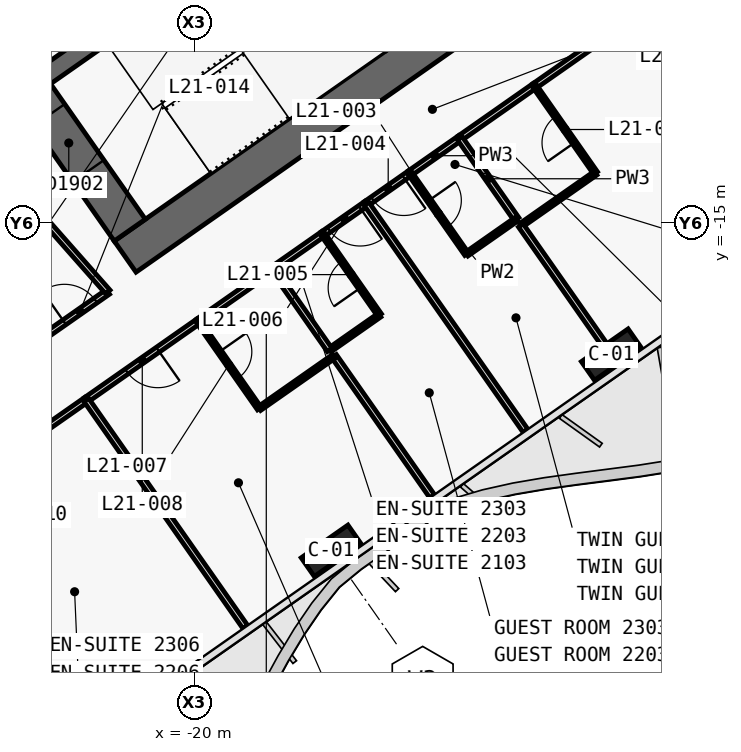
"""IFC4 building model, lengths in metres.
Left out: names, types, materials, properties, quantities, classifications, styles, units other than length and angle.
Written with IfcOpenShell. Run it as: python <this file> out.ifc"""

import sys

from ifc_helpers import new_model, si_unit, direction, frame, frame_2d, origin, origin_2d, place, context, subcontext, project, spatial, polyline, rectangle, outline, extrude, element, fill, save


model = new_model("IFC4")
c1 = context("Model", 3, precision=1e-05, world=origin(), true_north=direction((0.0, 1.0)))
c2 = subcontext(c1, "Body", "Model", "MODEL_VIEW")
j1 = project(units=[si_unit("LENGTHUNIT", "METRE"), si_unit("PLANEANGLEUNIT", "RADIAN")], contexts=[c1])
p1 = place(None, origin())
s1 = spatial("IfcSite", under=j1, at=p1, CompositionType="ELEMENT")
p2 = place(p1, origin())
s2 = spatial("IfcBuilding", under=s1, at=p2, CompositionType="ELEMENT")
p3 = place(p2, frame((0.0, 0.0, 101.3)))
s3 = spatial("IfcBuildingStorey", under=s2, at=p3, CompositionType="ELEMENT", Elevation=101.3)
p4 = place(p3, frame((0.037, -0.585, 0.0), z_axis=(0.0, 0.0, 1.0), x_axis=(-0.819157152511, -0.573569140985, 0.0)))
e1 = element("IfcWall", 1, at=p4, inside=s3, PredefinedType="SHEAR", context=c2, shape_type="SweptSolid", body=[
    extrude(outline(polyline([(26.695, 0.5), (0.7, 0.5), (0.0, -0.5), (26.695, -0.5), (26.695, 0.5)])), origin(), (0.0, 0.0, 1.0), 3.6),
])
p5 = place(p4, frame((2.995, 0.0, 0.0)))
e2 = element("IfcOpeningElement", 2, at=p5, cuts=e1, PredefinedType="OPENING", context=c2, shape_type="SweptSolid", body=[
    extrude(rectangle(XDim=2.4, YDim=2.1, at=frame_2d((1.2, 1.05))), frame((0.0, 0.51, 0.0), z_axis=(0.0, -1.0, 0.0), x_axis=(1.0, 0.0, 0.0)), (0.0, 0.0, 1.0), 1.02),
])
p6 = place(p4, frame((11.995, 0.0, 0.0)))
e3 = element("IfcOpeningElement", 3, at=p6, cuts=e1, PredefinedType="OPENING", context=c2, shape_type="SweptSolid", body=[
    extrude(rectangle(XDim=2.4, YDim=2.1, at=frame_2d((1.2, 1.05))), frame((0.0, 0.51, 0.0), z_axis=(0.0, -1.0, 0.0), x_axis=(1.0, 0.0, 0.0)), (0.0, 0.0, 1.0), 1.02),
])
p7 = place(p3, frame((-21.708, -15.2, 0.0), z_axis=(0.0, 0.0, 1.0), x_axis=(-0.573576324356, 0.819152122709, 0.0)))
e4 = element("IfcWall", 4, at=p7, inside=s3, PredefinedType="SHEAR", context=c2, shape_type="SweptSolid", body=[
    extrude(outline(polyline([(0.0, 0.5), (0.0, -0.5), (9.2, -0.5), (9.2, 0.5), (0.0, 0.5)])), origin(), (0.0, 0.0, 1.0), 3.6),
])
p8 = place(p7, frame((6.1, 0.0, 0.0)))
e5 = element("IfcOpeningElement", 5, at=p8, cuts=e4, PredefinedType="OPENING", context=c2, shape_type="SweptSolid", body=[
    extrude(rectangle(XDim=1.8, YDim=2.1, at=frame_2d((0.9, 1.05))), frame((0.0, 0.51, 0.0), z_axis=(0.0, -1.0, 0.0), x_axis=(1.0, 0.0, 0.0)), (0.0, 0.0, 1.0), 1.02),
])
p9 = place(p7, frame((1.9, 0.0, 0.0)))
e6 = element("IfcOpeningElement", 6, at=p9, cuts=e4, PredefinedType="OPENING", context=c2, shape_type="SweptSolid", body=[
    extrude(rectangle(XDim=1.8, YDim=2.1, at=frame_2d((0.9, 1.05))), frame((0.0, 0.51, 0.0), z_axis=(0.0, -1.0, 0.0), x_axis=(1.0, 0.0, 0.0)), (0.0, 0.0, 1.0), 1.02),
])
p10 = place(p3, frame((-2.638, 3.768, 0.0), z_axis=(0.0, 0.0, 1.0), x_axis=(-0.819148977158, -0.573580816643, 0.0)))
e7 = element("IfcWall", 7, at=p10, inside=s3, PredefinedType="SHEAR", context=c2, shape_type="SweptSolid", body=[
    extrude(outline(polyline([(26.0, 0.25), (0.0, 0.25), (0.0, -0.25), (26.0, -0.25), (26.0, 0.25)])), origin(), (0.0, 0.0, 1.0), 3.6),
])
p11 = place(p10, frame((1.169, 0.0, 0.0)))
e8 = element("IfcOpeningElement", 8, at=p11, cuts=e7, PredefinedType="OPENING", context=c2, shape_type="SweptSolid", body=[
    extrude(rectangle(XDim=1.1, YDim=2.1, at=frame_2d((0.55, 1.05))), frame((0.0, 0.26, 0.0), z_axis=(0.0, -1.0, 0.0), x_axis=(1.0, 0.0, 0.0)), (0.0, 0.0, 1.0), 0.52),
])
p12 = place(p10, frame((3.206, 0.0, 0.0)))
e9 = element("IfcOpeningElement", 9, at=p12, cuts=e7, PredefinedType="OPENING", context=c2, shape_type="SweptSolid", body=[
    extrude(rectangle(XDim=1.1, YDim=2.1, at=frame_2d((0.55, 1.05))), frame((0.0, 0.26, 0.0), z_axis=(0.0, -1.0, 0.0), x_axis=(1.0, 0.0, 0.0)), (0.0, 0.0, 1.0), 0.52),
])
p13 = place(p10, frame((5.244, 0.0, 0.0)))
e10 = element("IfcOpeningElement", 10, at=p13, cuts=e7, PredefinedType="OPENING", context=c2, shape_type="SweptSolid", body=[
    extrude(rectangle(XDim=1.1, YDim=2.1, at=frame_2d((0.55, 1.05))), frame((0.0, 0.26, 0.0), z_axis=(0.0, -1.0, 0.0), x_axis=(1.0, 0.0, 0.0)), (0.0, 0.0, 1.0), 0.52),
])
p14 = place(p10, frame((7.281, 0.0, 0.0)))
e11 = element("IfcOpeningElement", 11, at=p14, cuts=e7, PredefinedType="OPENING", context=c2, shape_type="SweptSolid", body=[
    extrude(rectangle(XDim=1.1, YDim=2.1, at=frame_2d((0.55, 1.05))), frame((0.0, 0.26, 0.0), z_axis=(0.0, -1.0, 0.0), x_axis=(1.0, 0.0, 0.0)), (0.0, 0.0, 1.0), 0.52),
])
p15 = place(p10, frame((9.688, 0.0, 0.0)))
e12 = element("IfcOpeningElement", 12, at=p15, cuts=e7, PredefinedType="OPENING", context=c2, shape_type="SweptSolid", body=[
    extrude(rectangle(XDim=1.1, YDim=2.1, at=frame_2d((0.55, 1.05))), frame((0.0, 0.26, 0.0), z_axis=(0.0, -1.0, 0.0), x_axis=(1.0, 0.0, 0.0)), (0.0, 0.0, 1.0), 0.52),
])
p16 = place(p10, frame((11.863, 0.0, 0.0)))
e13 = element("IfcOpeningElement", 13, at=p16, cuts=e7, PredefinedType="OPENING", context=c2, shape_type="SweptSolid", body=[
    extrude(rectangle(XDim=1.1, YDim=2.1, at=frame_2d((0.55, 1.05))), frame((0.0, 0.26, 0.0), z_axis=(0.0, -1.0, 0.0), x_axis=(1.0, 0.0, 0.0)), (0.0, 0.0, 1.0), 0.52),
])
p17 = place(p10, frame((14.038, 0.0, 0.0)))
e14 = element("IfcOpeningElement", 14, at=p17, cuts=e7, PredefinedType="OPENING", context=c2, shape_type="SweptSolid", body=[
    extrude(rectangle(XDim=1.1, YDim=2.1, at=frame_2d((0.55, 1.05))), frame((0.0, 0.26, 0.0), z_axis=(0.0, -1.0, 0.0), x_axis=(1.0, 0.0, 0.0)), (0.0, 0.0, 1.0), 0.52),
])
p18 = place(p10, frame((16.212, 0.0, 0.0)))
e15 = element("IfcOpeningElement", 15, at=p18, cuts=e7, PredefinedType="OPENING", context=c2, shape_type="SweptSolid", body=[
    extrude(rectangle(XDim=1.1, YDim=2.1, at=frame_2d((0.55, 1.05))), frame((0.0, 0.26, 0.0), z_axis=(0.0, -1.0, 0.0), x_axis=(1.0, 0.0, 0.0)), (0.0, 0.0, 1.0), 0.52),
])
for number, where, z_axis, x_axis in (
    (16, (-9.038, -18.475, 0.0), (0.0, 0.0, 1.0), (-0.819, -0.574, 0.0)),
    (17, (-16.41, -23.637, 0.0), (0.0, 0.0, 1.0), (-0.819, -0.574, 0.0)),
):
    element("IfcColumn", number, at=place(p3, frame(where, z_axis=z_axis, x_axis=x_axis)), inside=s3, PredefinedType="COLUMN", context=c2, shape_type="SweptSolid", body=[
        extrude(rectangle(XDim=1.5, YDim=0.6, at=origin_2d()), origin(), (0.0, 0.0, 1.0), 3.6),
    ])
p19 = place(p3, frame((-24.493, -18.371, 0.0), z_axis=(0.0, 0.0, 1.0), x_axis=(0.819176640776, 0.573541307325, 0.0)))
e18 = element("IfcWall", 18, at=p19, inside=s3, PredefinedType="PARTITIONING", context=c2, shape_type="SweptSolid", body=[
    extrude(rectangle(XDim=2.698, YDim=0.15, at=frame_2d((1.349, 0.0))), origin(), (0.0, 0.0, 1.0), 3.32),
])
p20 = place(p19, frame((1.301, 0.0, 0.0)))
e19 = element("IfcOpeningElement", 19, at=p20, cuts=e18, PredefinedType="OPENING", context=c2, shape_type="SweptSolid", body=[
    extrude(rectangle(XDim=1.0, YDim=2.1, at=frame_2d((0.5, 1.05))), frame((0.0, 0.085, 0.0), z_axis=(0.0, -1.0, 0.0), x_axis=(1.0, 0.0, 0.0)), (0.0, 0.0, 1.0), 0.17),
])
p21 = place(p3, frame((-5.652, -7.62, 0.0), z_axis=(0.0, 0.0, 1.0), x_axis=(-0.819155459934, -0.573571558274, 0.0)))
e20 = element("IfcWall", 20, at=p21, inside=s3, PredefinedType="PARTITIONING", context=c2, shape_type="SweptSolid", body=[
    extrude(rectangle(XDim=6.601, YDim=0.15, at=frame_2d((3.301, 0.0))), origin(), (0.0, 0.0, 1.0), 2.6),
])
p22 = place(p21, frame((2.8, 0.0, 0.0)))
e21 = element("IfcOpeningElement", 21, at=p22, cuts=e20, PredefinedType="OPENING", context=c2, shape_type="SweptSolid", body=[
    extrude(rectangle(XDim=1.0, YDim=2.1, at=frame_2d((0.5, 1.05))), frame((0.0, 0.085, 0.0), z_axis=(0.0, -1.0, 0.0), x_axis=(1.0, 0.0, 0.0)), (0.0, 0.0, 1.0), 0.17),
])
p23 = place(p3, frame((-11.056, -11.404, 0.0), z_axis=(0.0, 0.0, 1.0), x_axis=(-0.819146032251, -0.573585022335, 0.0)))
e22 = element("IfcWall", 22, at=p23, inside=s3, PredefinedType="PARTITIONING", context=c2, shape_type="SweptSolid", body=[
    extrude(rectangle(XDim=2.404, YDim=0.15, at=frame_2d((1.202, 0.0))), origin(), (0.0, 0.0, 1.0), 2.6),
])
p24 = place(p3, frame((-14.334, -13.699, 0.0), z_axis=(0.0, 0.0, 1.0), x_axis=(-0.819199220913, -0.573509055252, 0.0)))
e23 = element("IfcWall", 23, at=p24, inside=s3, PredefinedType="PARTITIONING", context=c2, shape_type="SweptSolid", body=[
    extrude(rectangle(XDim=1.403, YDim=0.15, at=frame_2d((0.702, 0.0))), origin(), (0.0, 0.0, 1.0), 3.32),
])
p25 = place(p24, frame((0.201, 0.0, 0.0)))
e24 = element("IfcOpeningElement", 24, at=p25, cuts=e23, PredefinedType="OPENING", context=c2, shape_type="SweptSolid", body=[
    extrude(rectangle(XDim=1.0, YDim=2.1, at=frame_2d((0.5, 1.05))), frame((0.0, 0.085, 0.0), z_axis=(0.0, -1.0, 0.0), x_axis=(1.0, 0.0, 0.0)), (0.0, 0.0, 1.0), 0.17),
])
p26 = place(p3, frame((-13.022, -12.781, 0.0), z_axis=(0.0, 0.0, 1.0), x_axis=(-0.819138938282, -0.573595153214, 0.0)))
e25 = element("IfcWall", 25, at=p26, inside=s3, PredefinedType="PARTITIONING", context=c2, shape_type="SweptSolid", body=[
    extrude(rectangle(XDim=1.604, YDim=0.15, at=frame_2d((0.802, 0.0))), origin(), (0.0, 0.0, 1.0), 2.6),
])
p27 = place(p3, frame((-15.48, -14.501, 0.0), z_axis=(0.0, 0.0, 1.0), x_axis=(-0.819199220913, -0.573509055252, 0.0)))
e26 = element("IfcWall", 26, at=p27, inside=s3, PredefinedType="PARTITIONING", context=c2, shape_type="SweptSolid", body=[
    extrude(rectangle(XDim=1.403, YDim=0.15, at=frame_2d((0.702, 0.0))), origin(), (0.0, 0.0, 1.0), 3.32),
])
p28 = place(p27, frame((0.202, 0.0, 0.0)))
e27 = element("IfcOpeningElement", 27, at=p28, cuts=e26, PredefinedType="OPENING", context=c2, shape_type="SweptSolid", body=[
    extrude(rectangle(XDim=1.0, YDim=2.1, at=frame_2d((0.5, 1.05))), frame((0.0, 0.085, 0.0), z_axis=(0.0, -1.0, 0.0), x_axis=(1.0, 0.0, 0.0)), (0.0, 0.0, 1.0), 0.17),
])
p29 = place(p3, frame((-16.627, -15.304, 0.0), z_axis=(0.0, 0.0, 1.0), x_axis=(-0.819189013667, -0.573523634986, 0.0)))
e28 = element("IfcWall", 28, at=p29, inside=s3, PredefinedType="PARTITIONING", context=c2, shape_type="SweptSolid", body=[
    extrude(rectangle(XDim=1.604, YDim=0.15, at=frame_2d((0.802, 0.0))), origin(), (0.0, 0.0, 1.0), 3.32),
])
p30 = place(p3, frame((-19.904, -17.599, 0.0), z_axis=(0.0, 0.0, 1.0), x_axis=(-0.819145961204, -0.573585123798, 0.0)))
e29 = element("IfcWall", 29, at=p30, inside=s3, PredefinedType="PARTITIONING", context=c2, shape_type="SweptSolid", body=[
    extrude(rectangle(XDim=3.603, YDim=0.15, at=frame_2d((1.802, 0.0))), origin(), (0.0, 0.0, 1.0), 2.6),
])
p31 = place(p30, frame((1.301, 0.0, 0.0)))
e30 = element("IfcOpeningElement", 30, at=p31, cuts=e29, PredefinedType="OPENING", context=c2, shape_type="SweptSolid", body=[
    extrude(rectangle(XDim=1.0, YDim=2.1, at=frame_2d((0.5, 1.05))), frame((0.0, 0.085, 0.0), z_axis=(0.0, -1.0, 0.0), x_axis=(1.0, 0.0, 0.0)), (0.0, 0.0, 1.0), 0.17),
])
p32 = place(p3, frame((-17.937, -16.222, 0.0), z_axis=(0.0, 0.0, 1.0), x_axis=(-0.819146032251, -0.573585022335, 0.0)))
e31 = element("IfcWall", 31, at=p32, inside=s3, PredefinedType="PARTITIONING", context=c2, shape_type="SweptSolid", body=[
    extrude(rectangle(XDim=2.404, YDim=0.15, at=frame_2d((1.202, 0.0))), origin(), (0.0, 0.0, 1.0), 3.32),
])
p33 = place(p3, frame((-22.852, -19.664, 0.0), z_axis=(0.0, 0.0, 1.0), x_axis=(-0.819141582452, -0.573591377113, 0.0)))
e32 = element("IfcWall", 32, at=p33, inside=s3, PredefinedType="PARTITIONING", context=c2, shape_type="SweptSolid", body=[
    extrude(rectangle(XDim=6.603, YDim=0.15, at=frame_2d((3.301, 0.0))), origin(), (0.0, 0.0, 1.0), 2.6),
])
p34 = place(p33, frame((2.802, 0.0, 0.0)))
e33 = element("IfcOpeningElement", 33, at=p34, cuts=e32, PredefinedType="OPENING", context=c2, shape_type="SweptSolid", body=[
    extrude(rectangle(XDim=1.0, YDim=2.1, at=frame_2d((0.5, 1.05))), frame((0.0, 0.085, 0.0), z_axis=(0.0, -1.0, 0.0), x_axis=(1.0, 0.0, 0.0)), (0.0, 0.0, 1.0), 0.17),
])
p35 = place(p3, frame((-22.284, -16.827, 0.0), z_axis=(0.0, 0.0, 1.0), x_axis=(-0.661545117561, 0.749905365651, 0.0)))
e34 = element("IfcWall", 34, at=p35, inside=s3, PredefinedType="PARTITIONING", context=c2, shape_type="SweptSolid", body=[
    extrude(rectangle(XDim=6.543, YDim=0.15, at=frame_2d((3.271, 0.0))), origin(), (0.0, 0.0, 1.0), 2.6),
])
p36 = place(p3, frame((-11.417, -15.076, 0.0), z_axis=(0.0, 0.0, 1.0), x_axis=(0.819141114317, 0.573592045652, 0.0)))
e35 = element("IfcWall", 35, at=p36, inside=s3, PredefinedType="PARTITIONING", context=c2, shape_type="SweptSolid", body=[
    extrude(rectangle(XDim=2.4, YDim=0.12, at=frame_2d((1.2, 0.0))), origin(), (0.0, 0.0, 1.0), 2.6),
])
p37 = place(p3, frame((-9.451, -13.698, 0.0), z_axis=(0.0, 0.0, 1.0), x_axis=(-0.573591086599, 0.819141785879, 0.0)))
e36 = element("IfcWall", 36, at=p37, inside=s3, PredefinedType="PARTITIONING", context=c2, shape_type="SweptSolid", body=[
    extrude(rectangle(XDim=2.8, YDim=0.12, at=frame_2d((1.4, 0.0))), origin(), (0.0, 0.0, 1.0), 3.32),
])
p38 = place(p37, frame((0.975, 0.0, 0.0)))
e37 = element("IfcOpeningElement", 37, at=p38, cuts=e36, PredefinedType="OPENING", context=c2, shape_type="SweptSolid", body=[
    extrude(rectangle(XDim=0.85, YDim=2.05, at=frame_2d((0.425, 1.025))), frame((0.0, 0.07, 0.0), z_axis=(0.0, -1.0, 0.0), x_axis=(1.0, 0.0, 0.0)), (0.0, 0.0, 1.0), 0.14),
])
p39 = place(p3, frame((-9.221, -18.213, 0.0), z_axis=(0.0, 0.0, 1.0), x_axis=(-0.573594994199, 0.819139049631, 0.0)))
e38 = element("IfcWall", 38, at=p39, inside=s3, PredefinedType="PARTITIONING", context=c2, shape_type="SweptSolid", body=[
    extrude(rectangle(XDim=3.829, YDim=0.15, at=frame_2d((1.915, 0.0))), origin(), (0.0, 0.0, 1.0), 2.6),
])
p40 = place(p3, frame((-11.531, -14.913, 0.0), z_axis=(0.0, 0.0, 1.0), x_axis=(-0.573544201094, 0.819174614714, 0.0)))
e39 = element("IfcWall", 39, at=p40, inside=s3, PredefinedType="PARTITIONING", context=c2, shape_type="SweptSolid", body=[
    extrude(rectangle(XDim=2.602, YDim=0.15, at=frame_2d((1.301, 0.0))), origin(), (0.0, 0.0, 1.0), 2.6),
])
p41 = place(p3, frame((-14.335, -13.7, 0.0), z_axis=(0.0, 0.0, 1.0), x_axis=(0.573582085028, -0.819148089014, 0.0)))
e40 = element("IfcWall", 40, at=p41, inside=s3, PredefinedType="PARTITIONING", context=c2, shape_type="SweptSolid", body=[
    extrude(rectangle(XDim=2.6, YDim=0.12, at=frame_2d((1.3, 0.0))), origin(), (0.0, 0.0, 1.0), 3.32),
])
p42 = place(p41, frame((0.875, 0.0, 0.0)))
e41 = element("IfcOpeningElement", 41, at=p42, cuts=e40, PredefinedType="OPENING", context=c2, shape_type="SweptSolid", body=[
    extrude(rectangle(XDim=0.85, YDim=2.05, at=frame_2d((0.425, 1.025))), frame((0.0, 0.07, 0.0), z_axis=(0.0, -1.0, 0.0), x_axis=(1.0, 0.0, 0.0)), (0.0, 0.0, 1.0), 0.14),
])
p43 = place(p3, frame((-12.843, -15.83, 0.0), z_axis=(0.0, 0.0, 1.0), x_axis=(0.81918174131, 0.573534022273, 0.0)))
e42 = element("IfcWall", 42, at=p43, inside=s3, PredefinedType="PARTITIONING", context=c2, shape_type="SweptSolid", body=[
    extrude(rectangle(XDim=1.6, YDim=0.12, at=frame_2d((0.8, 0.0))), origin(), (0.0, 0.0, 1.0), 2.6),
])
p44 = place(p3, frame((-11.294, -20.482, 0.0), z_axis=(0.0, 0.0, 1.0), x_axis=(-0.573572324301, 0.819154923562, 0.0)))
e43 = element("IfcWall", 43, at=p44, inside=s3, PredefinedType="PARTITIONING", context=c2, shape_type="SweptSolid", body=[
    extrude(rectangle(XDim=7.3, YDim=0.15, at=frame_2d((3.65, 0.0))), origin(), (0.0, 0.0, 1.0), 2.5),
])
p45 = place(p3, frame((-16.447, -18.354, 0.0), z_axis=(0.0, 0.0, 1.0), x_axis=(0.819131543282, 0.57360571371, 0.0)))
e44 = element("IfcWall", 44, at=p45, inside=s3, PredefinedType="PARTITIONING", context=c2, shape_type="SweptSolid", body=[
    extrude(rectangle(XDim=1.6, YDim=0.12, at=frame_2d((0.8, 0.0))), origin(), (0.0, 0.0, 1.0), 3.32),
])
p46 = place(p3, frame((-15.136, -17.435, 0.0), z_axis=(0.0, 0.0, 1.0), x_axis=(-0.573537965655, 0.819178980414, 0.0)))
e45 = element("IfcWall", 45, at=p46, inside=s3, PredefinedType="PARTITIONING", context=c2, shape_type="SweptSolid", body=[
    extrude(rectangle(XDim=2.6, YDim=0.12, at=frame_2d((1.3, 0.0))), origin(), (0.0, 0.0, 1.0), 3.32),
])
p47 = place(p46, frame((0.875, 0.0, 0.0)))
e46 = element("IfcOpeningElement", 46, at=p47, cuts=e45, PredefinedType="OPENING", context=c2, shape_type="SweptSolid", body=[
    extrude(rectangle(XDim=0.85, YDim=2.05, at=frame_2d((0.425, 1.025))), frame((0.0, 0.07, 0.0), z_axis=(0.0, -1.0, 0.0), x_axis=(1.0, 0.0, 0.0)), (0.0, 0.0, 1.0), 0.14),
])
p48 = place(p3, frame((-13.752, -22.203, 0.0), z_axis=(0.0, 0.0, 1.0), x_axis=(-0.573593387921, 0.81914017441, 0.0)))
e47 = element("IfcWall", 47, at=p48, inside=s3, PredefinedType="PARTITIONING", context=c2, shape_type="SweptSolid", body=[
    extrude(rectangle(XDim=4.501, YDim=0.15, at=frame_2d((2.25, 0.0))), origin(), (0.0, 0.0, 1.0), 2.5),
])
p49 = place(p3, frame((-16.448, -18.353, 0.0), z_axis=(0.0, 0.0, 1.0), x_axis=(-0.573645091666, 0.819103967032, 0.0)))
e48 = element("IfcWall", 48, at=p49, inside=s3, PredefinedType="PARTITIONING", context=c2, shape_type="SweptSolid", body=[
    extrude(rectangle(XDim=2.6, YDim=0.15, at=frame_2d((1.3, 0.0))), origin(), (0.0, 0.0, 1.0), 3.32),
])
p50 = place(p3, frame((-19.906, -17.6, 0.0), z_axis=(0.0, 0.0, 1.0), x_axis=(0.573550118428, -0.819170471667, 0.0)))
e49 = element("IfcWall", 49, at=p50, inside=s3, PredefinedType="PARTITIONING", context=c2, shape_type="SweptSolid", body=[
    extrude(rectangle(XDim=2.8, YDim=0.12, at=frame_2d((1.4, 0.0))), origin(), (0.0, 0.0, 1.0), 3.32),
])
p51 = place(p50, frame((0.975, 0.0, 0.0)))
e50 = element("IfcOpeningElement", 50, at=p51, cuts=e49, PredefinedType="OPENING", context=c2, shape_type="SweptSolid", body=[
    extrude(rectangle(XDim=0.85, YDim=2.05, at=frame_2d((0.425, 1.025))), frame((0.0, 0.07, 0.0), z_axis=(0.0, -1.0, 0.0), x_axis=(1.0, 0.0, 0.0)), (0.0, 0.0, 1.0), 0.14),
])
p52 = place(p3, frame((-18.298, -19.894, 0.0), z_axis=(0.0, 0.0, 1.0), x_axis=(0.819141114317, 0.573592045652, 0.0)))
e51 = element("IfcWall", 51, at=p52, inside=s3, PredefinedType="PARTITIONING", context=c2, shape_type="SweptSolid", body=[
    extrude(rectangle(XDim=2.4, YDim=0.12, at=frame_2d((1.2, 0.0))), origin(), (0.0, 0.0, 1.0), 3.32),
])
p53 = place(p3, frame((-18.667, -25.645, 0.0), z_axis=(0.0, 0.0, 1.0), x_axis=(-0.573572324301, 0.819154923562, 0.0)))
e52 = element("IfcWall", 52, at=p53, inside=s3, PredefinedType="PARTITIONING", context=c2, shape_type="SweptSolid", body=[
    extrude(rectangle(XDim=7.3, YDim=0.15, at=frame_2d((3.65, 0.0))), origin(), (0.0, 0.0, 1.0), 2.5),
])
p54 = place(p9, origin())
e53 = element("IfcDoor", 53, at=p54, inside=s3, OperationType="DOUBLE_DOOR_SINGLE_SWING", PredefinedType="DOOR", context=c2, shape_type="SweptSolid", body=[
    extrude(rectangle(XDim=1.8, YDim=2.1, at=frame_2d((0.9, 1.05))), frame((0.0, 0.025, 0.0), z_axis=(0.0, -1.0, 0.0), x_axis=(1.0, 0.0, 0.0)), (0.0, 0.0, 1.0), 0.05),
])
fill(e6, e53)
p55 = place(p38, origin())
e54 = element("IfcDoor", 54, at=p55, inside=s3, OperationType="SINGLE_SWING_LEFT", PredefinedType="DOOR", context=c2, shape_type="SweptSolid", body=[
    extrude(rectangle(XDim=0.85, YDim=2.05, at=frame_2d((0.425, 1.025))), frame((0.0, 0.025, 0.0), z_axis=(0.0, -1.0, 0.0), x_axis=(1.0, 0.0, 0.0)), (0.0, 0.0, 1.0), 0.05),
])
fill(e37, e54)
p56 = place(p42, origin())
e55 = element("IfcDoor", 55, at=p56, inside=s3, OperationType="SINGLE_SWING_RIGHT", PredefinedType="DOOR", context=c2, shape_type="SweptSolid", body=[
    extrude(rectangle(XDim=0.85, YDim=2.05, at=frame_2d((0.425, 1.025))), frame((0.0, 0.025, 0.0), z_axis=(0.0, -1.0, 0.0), x_axis=(1.0, 0.0, 0.0)), (0.0, 0.0, 1.0), 0.05),
])
fill(e41, e55)
p57 = place(p25, origin())
e56 = element("IfcDoor", 56, at=p57, inside=s3, OperationType="SINGLE_SWING_LEFT", PredefinedType="DOOR", context=c2, shape_type="SweptSolid", body=[
    extrude(rectangle(XDim=1.0, YDim=2.1, at=frame_2d((0.5, 1.05))), frame((0.0, 0.025, 0.0), z_axis=(0.0, -1.0, 0.0), x_axis=(1.0, 0.0, 0.0)), (0.0, 0.0, 1.0), 0.05),
])
fill(e24, e56)
p58 = place(p47, origin())
e57 = element("IfcDoor", 57, at=p58, inside=s3, OperationType="SINGLE_SWING_RIGHT", PredefinedType="DOOR", context=c2, shape_type="SweptSolid", body=[
    extrude(rectangle(XDim=0.85, YDim=2.05, at=frame_2d((0.425, 1.025))), frame((0.0, 0.025, 0.0), z_axis=(0.0, -1.0, 0.0), x_axis=(1.0, 0.0, 0.0)), (0.0, 0.0, 1.0), 0.05),
])
fill(e46, e57)
p59 = place(p28, origin())
e58 = element("IfcDoor", 58, at=p59, inside=s3, OperationType="SINGLE_SWING_LEFT", PredefinedType="DOOR", context=c2, shape_type="SweptSolid", body=[
    extrude(rectangle(XDim=1.0, YDim=2.1, at=frame_2d((0.5, 1.05))), frame((0.0, 0.025, 0.0), z_axis=(0.0, -1.0, 0.0), x_axis=(1.0, 0.0, 0.0)), (0.0, 0.0, 1.0), 0.05),
])
fill(e27, e58)
p60 = place(p51, origin())
e59 = element("IfcDoor", 59, at=p60, inside=s3, OperationType="SINGLE_SWING_LEFT", PredefinedType="DOOR", context=c2, shape_type="SweptSolid", body=[
    extrude(rectangle(XDim=0.85, YDim=2.05, at=frame_2d((0.425, 1.025))), frame((0.0, 0.025, 0.0), z_axis=(0.0, -1.0, 0.0), x_axis=(1.0, 0.0, 0.0)), (0.0, 0.0, 1.0), 0.05),
])
fill(e50, e59)
p61 = place(p31, origin())
e60 = element("IfcDoor", 60, at=p61, inside=s3, OperationType="SINGLE_SWING_RIGHT", PredefinedType="DOOR", context=c2, shape_type="SweptSolid", body=[
    extrude(rectangle(XDim=1.0, YDim=2.1, at=frame_2d((0.5, 1.05))), frame((0.0, 0.025, 0.0), z_axis=(0.0, -1.0, 0.0), x_axis=(1.0, 0.0, 0.0)), (0.0, 0.0, 1.0), 0.05),
])
fill(e30, e60)
p62 = place(p20, origin())
e61 = element("IfcDoor", 61, at=p62, inside=s3, OperationType="SINGLE_SWING_RIGHT", PredefinedType="DOOR", context=c2, shape_type="SweptSolid", body=[
    extrude(rectangle(XDim=1.0, YDim=2.1, at=frame_2d((0.5, 1.05))), frame((0.0, 0.025, 0.0), z_axis=(0.0, -1.0, 0.0), x_axis=(1.0, 0.0, 0.0)), (0.0, 0.0, 1.0), 0.05),
])
fill(e19, e61)
save(model, sys.argv[1])
